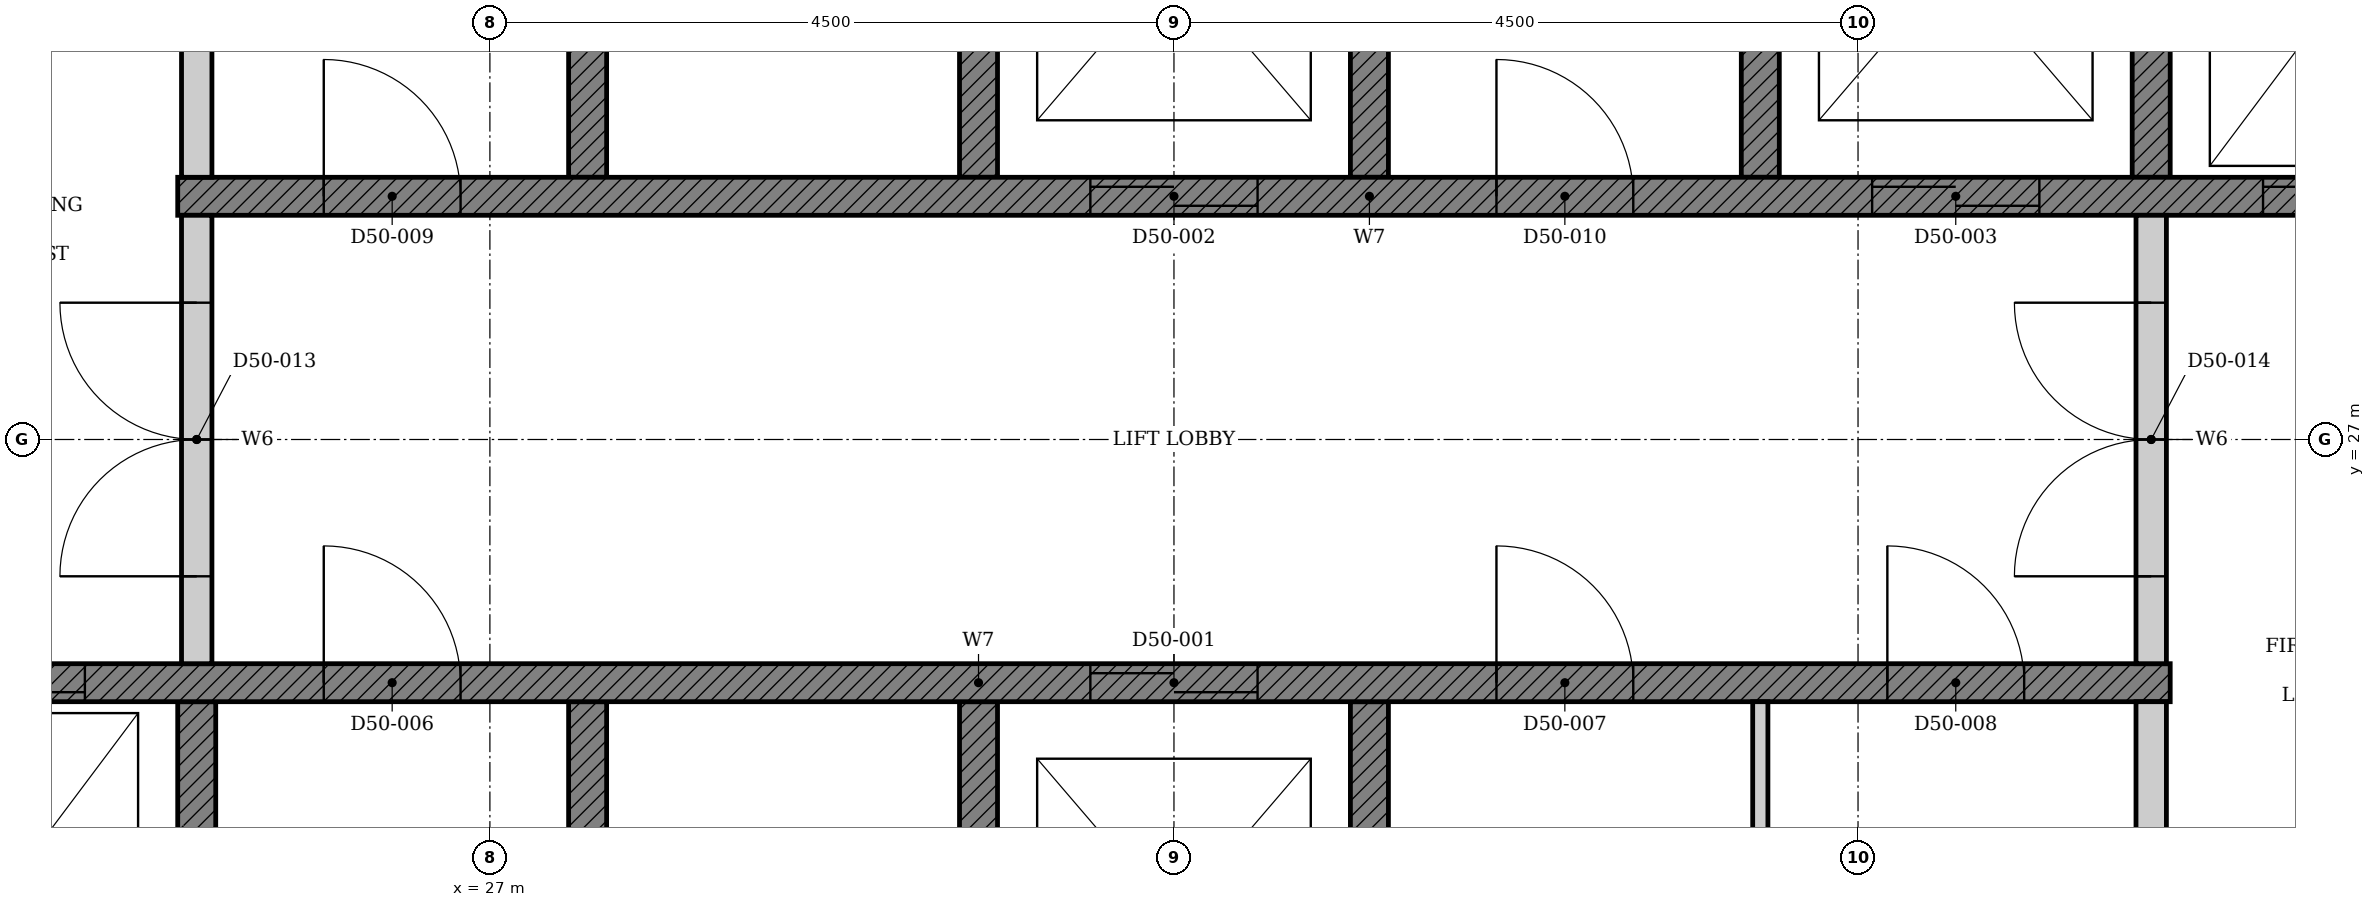
"""IFC4 building model, lengths in metres.
Left out: names, types, materials, properties, quantities, classifications, styles, units other than length and angle.
Written with IfcOpenShell. Run it as: python <this file> out.ifc"""

import sys

from ifc_helpers import new_model, si_unit, direction, frame, frame_2d, origin, place, context, subcontext, project, spatial, polyline, rectangle, outline, extrude, element, fill, save


model = new_model("IFC4")
c1 = context("Model", 3, precision=1e-05, world=origin(), true_north=direction((0.0, 1.0)))
c2 = subcontext(c1, "Body", "Model", "MODEL_VIEW")
j1 = project(units=[si_unit("LENGTHUNIT", "METRE"), si_unit("PLANEANGLEUNIT", "RADIAN")], contexts=[c1])
p1 = place(None, origin())
s1 = spatial("IfcSite", under=j1, at=p1, CompositionType="ELEMENT")
p2 = place(p1, origin())
s2 = spatial("IfcBuilding", under=s1, at=p2, CompositionType="ELEMENT")
p3 = place(p2, frame((0.0, 0.0, 199.8)))
s3 = spatial("IfcBuildingStorey", under=s2, at=p3, CompositionType="ELEMENT", Elevation=199.8)
p4 = place(p3, origin())
e1 = element("IfcWall", 1, at=p4, inside=s3, PredefinedType="SHEAR", context=c2, shape_type="SweptSolid", body=[
    extrude(outline(polyline([(22.375, 22.35), (25.197, 22.35), (25.197, 25.275), (24.947, 25.275), (24.947, 22.65), (22.625, 22.65), (22.625, 25.275), (22.375, 25.275), (22.375, 22.35)])), origin(), (0.0, 0.0, 1.0), 3.4),
])
p5 = place(p3, origin())
e2 = element("IfcWall", 2, at=p5, inside=s3, PredefinedType="SHEAR", context=c2, shape_type="SweptSolid", body=[
    extrude(outline(polyline([(27.518, 22.35), (32.911, 22.35), (32.911, 25.275), (32.661, 25.275), (32.661, 22.65), (30.339, 22.65), (30.339, 25.275), (30.089, 25.275), (30.089, 22.65), (27.768, 22.65), (27.768, 25.275), (27.518, 25.275), (27.518, 22.35)])), origin(), (0.0, 0.0, 1.0), 3.4),
])
p6 = place(p3, origin())
e3 = element("IfcWall", 3, at=p6, inside=s3, PredefinedType="SHEAR", context=c2, shape_type="SweptSolid", body=[
    extrude(outline(polyline([(27.518, 28.725), (27.768, 28.725), (27.768, 31.35), (30.089, 31.35), (30.089, 28.725), (30.339, 28.725), (30.339, 31.35), (32.661, 31.35), (32.661, 28.725), (32.911, 28.725), (32.911, 31.65), (27.518, 31.65), (27.518, 28.725)])), origin(), (0.0, 0.0, 1.0), 3.4),
])
p7 = place(p3, origin())
e4 = element("IfcWall", 4, at=p7, inside=s3, PredefinedType="SHEAR", context=c2, shape_type="SweptSolid", body=[
    extrude(outline(polyline([(35.232, 28.725), (35.482, 28.725), (35.482, 31.35), (37.803, 31.35), (37.803, 28.725), (38.053, 28.725), (38.053, 31.35), (40.375, 31.35), (40.375, 28.725), (40.625, 28.725), (40.625, 31.65), (35.232, 31.65), (35.232, 28.725)])), origin(), (0.0, 0.0, 1.0), 3.4),
])
p8 = place(p3, frame((22.375, 25.4, 0.0), z_axis=(0.0, 0.0, 1.0), x_axis=(1.0, 0.0, 0.0)))
e5 = element("IfcWall", 5, at=p8, inside=s3, PredefinedType="SHEAR", context=c2, shape_type="SweptSolid", body=[
    extrude(rectangle(XDim=15.678, YDim=0.25, at=frame_2d((7.839, 0.0))), origin(), (0.0, 0.0, 1.0), 3.4),
])
p9 = place(p8, frame((8.575, 0.0, 0.0)))
e6 = element("IfcOpeningElement", 6, at=p9, cuts=e5, PredefinedType="OPENING", context=c2, shape_type="SweptSolid", body=[
    extrude(rectangle(XDim=1.1, YDim=2.1, at=frame_2d((0.55, 1.05))), frame((0.0, 0.135, 0.0), z_axis=(0.0, -1.0, 0.0), x_axis=(1.0, 0.0, 0.0)), (0.0, 0.0, 1.0), 0.27),
])
p10 = place(p8, frame((0.861, 0.0, 0.0)))
e7 = element("IfcOpeningElement", 7, at=p10, cuts=e5, PredefinedType="OPENING", context=c2, shape_type="SweptSolid", body=[
    extrude(rectangle(XDim=1.1, YDim=2.1, at=frame_2d((0.55, 1.05))), frame((0.0, 0.135, 0.0), z_axis=(0.0, -1.0, 0.0), x_axis=(1.0, 0.0, 0.0)), (0.0, 0.0, 1.0), 0.27),
])
p11 = place(p8, frame((3.532, 0.0, 0.0)))
e8 = element("IfcOpeningElement", 8, at=p11, cuts=e5, PredefinedType="OPENING", context=c2, shape_type="SweptSolid", body=[
    extrude(rectangle(XDim=0.9, YDim=2.1, at=frame_2d((0.45, 1.05))), frame((0.0, 0.135, 0.0), z_axis=(0.0, -1.0, 0.0), x_axis=(1.0, 0.0, 0.0)), (0.0, 0.0, 1.0), 0.27),
])
p12 = place(p8, frame((11.246, 0.0, 0.0)))
e9 = element("IfcOpeningElement", 9, at=p12, cuts=e5, PredefinedType="OPENING", context=c2, shape_type="SweptSolid", body=[
    extrude(rectangle(XDim=0.9, YDim=2.1, at=frame_2d((0.45, 1.05))), frame((0.0, 0.135, 0.0), z_axis=(0.0, -1.0, 0.0), x_axis=(1.0, 0.0, 0.0)), (0.0, 0.0, 1.0), 0.27),
])
p13 = place(p8, frame((13.818, 0.0, 0.0)))
e10 = element("IfcOpeningElement", 10, at=p13, cuts=e5, PredefinedType="OPENING", context=c2, shape_type="SweptSolid", body=[
    extrude(rectangle(XDim=0.9, YDim=2.1, at=frame_2d((0.45, 1.05))), frame((0.0, 0.135, 0.0), z_axis=(0.0, -1.0, 0.0), x_axis=(1.0, 0.0, 0.0)), (0.0, 0.0, 1.0), 0.27),
])
p14 = place(p3, frame((24.947, 28.6, 0.0), z_axis=(0.0, 0.0, 1.0), x_axis=(1.0, 0.0, 0.0)))
e11 = element("IfcWall", 11, at=p14, inside=s3, PredefinedType="SHEAR", context=c2, shape_type="SweptSolid", body=[
    extrude(rectangle(XDim=15.678, YDim=0.25, at=frame_2d((7.839, 0.0))), origin(), (0.0, 0.0, 1.0), 3.4),
])
p15 = place(p14, frame((6.004, 0.0, 0.0)))
e12 = element("IfcOpeningElement", 12, at=p15, cuts=e11, PredefinedType="OPENING", context=c2, shape_type="SweptSolid", body=[
    extrude(rectangle(XDim=1.1, YDim=2.1, at=frame_2d((0.55, 1.05))), frame((0.0, 0.135, 0.0), z_axis=(0.0, -1.0, 0.0), x_axis=(1.0, 0.0, 0.0)), (0.0, 0.0, 1.0), 0.27),
])
p16 = place(p14, frame((11.146, 0.0, 0.0)))
e13 = element("IfcOpeningElement", 13, at=p16, cuts=e11, PredefinedType="OPENING", context=c2, shape_type="SweptSolid", body=[
    extrude(rectangle(XDim=1.1, YDim=2.1, at=frame_2d((0.55, 1.05))), frame((0.0, 0.135, 0.0), z_axis=(0.0, -1.0, 0.0), x_axis=(1.0, 0.0, 0.0)), (0.0, 0.0, 1.0), 0.27),
])
p17 = place(p14, frame((13.718, 0.0, 0.0)))
e14 = element("IfcOpeningElement", 14, at=p17, cuts=e11, PredefinedType="OPENING", context=c2, shape_type="SweptSolid", body=[
    extrude(rectangle(XDim=1.1, YDim=2.1, at=frame_2d((0.55, 1.05))), frame((0.0, 0.135, 0.0), z_axis=(0.0, -1.0, 0.0), x_axis=(1.0, 0.0, 0.0)), (0.0, 0.0, 1.0), 0.27),
])
p18 = place(p14, frame((0.961, 0.0, 0.0)))
e15 = element("IfcOpeningElement", 15, at=p18, cuts=e11, PredefinedType="OPENING", context=c2, shape_type="SweptSolid", body=[
    extrude(rectangle(XDim=0.9, YDim=2.1, at=frame_2d((0.45, 1.05))), frame((0.0, 0.135, 0.0), z_axis=(0.0, -1.0, 0.0), x_axis=(1.0, 0.0, 0.0)), (0.0, 0.0, 1.0), 0.27),
])
p19 = place(p14, frame((8.675, 0.0, 0.0)))
e16 = element("IfcOpeningElement", 16, at=p19, cuts=e11, PredefinedType="OPENING", context=c2, shape_type="SweptSolid", body=[
    extrude(rectangle(XDim=0.9, YDim=2.1, at=frame_2d((0.45, 1.05))), frame((0.0, 0.135, 0.0), z_axis=(0.0, -1.0, 0.0), x_axis=(1.0, 0.0, 0.0)), (0.0, 0.0, 1.0), 0.27),
])
p20 = place(p3, frame((37.928, 22.65, 0.0), z_axis=(0.0, 0.0, 1.0), x_axis=(0.0, 1.0, 0.0)))
e17 = element("IfcWall", 17, at=p20, inside=s3, PredefinedType="PARTITIONING", context=c2, shape_type="SweptSolid", body=[
    extrude(rectangle(XDim=2.625, YDim=0.2, at=frame_2d((1.312, 0.0))), origin(), (0.0, 0.0, 1.0), 3.4),
])
p21 = place(p3, frame((35.357, 22.65, 0.0), z_axis=(0.0, 0.0, 1.0), x_axis=(0.0, 1.0, 0.0)))
e18 = element("IfcWall", 18, at=p21, inside=s3, PredefinedType="PARTITIONING", context=c2, shape_type="SweptSolid", body=[
    extrude(rectangle(XDim=2.625, YDim=0.1, at=frame_2d((1.312, 0.0))), origin(), (0.0, 0.0, 1.0), 3.4),
])
p22 = place(p3, frame((25.072, 28.725, 0.0), z_axis=(0.0, 0.0, 1.0), x_axis=(0.0, 1.0, 0.0)))
e19 = element("IfcWall", 19, at=p22, inside=s3, PredefinedType="PARTITIONING", context=c2, shape_type="SweptSolid", body=[
    extrude(rectangle(XDim=2.625, YDim=0.2, at=frame_2d((1.312, 0.0))), origin(), (0.0, 0.0, 1.0), 3.4),
])
p23 = place(p3, frame((25.072, 25.525, 0.0), z_axis=(0.0, 0.0, 1.0), x_axis=(0.0, 1.0, 0.0)))
e20 = element("IfcWall", 20, at=p23, inside=s3, PredefinedType="PARTITIONING", context=c2, shape_type="SweptSolid", body=[
    extrude(rectangle(XDim=2.95, YDim=0.2, at=frame_2d((1.475, 0.0))), origin(), (0.0, 0.0, 1.0), 3.4),
])
p24 = place(p23, frame((0.575, 0.0, 0.0)))
e21 = element("IfcOpeningElement", 21, at=p24, cuts=e20, PredefinedType="OPENING", context=c2, shape_type="SweptSolid", body=[
    extrude(rectangle(XDim=1.8, YDim=2.1, at=frame_2d((0.9, 1.05))), frame((0.0, 0.11, 0.0), z_axis=(0.0, -1.0, 0.0), x_axis=(1.0, 0.0, 0.0)), (0.0, 0.0, 1.0), 0.22),
])
p25 = place(p3, frame((37.928, 25.525, 0.0), z_axis=(0.0, 0.0, 1.0), x_axis=(0.0, 1.0, 0.0)))
e22 = element("IfcWall", 22, at=p25, inside=s3, PredefinedType="PARTITIONING", context=c2, shape_type="SweptSolid", body=[
    extrude(rectangle(XDim=2.95, YDim=0.2, at=frame_2d((1.475, 0.0))), origin(), (0.0, 0.0, 1.0), 3.4),
])
p26 = place(p25, frame((0.575, 0.0, 0.0)))
e23 = element("IfcOpeningElement", 23, at=p26, cuts=e22, PredefinedType="OPENING", context=c2, shape_type="SweptSolid", body=[
    extrude(rectangle(XDim=1.8, YDim=2.1, at=frame_2d((0.9, 1.05))), frame((0.0, 0.11, 0.0), z_axis=(0.0, -1.0, 0.0), x_axis=(1.0, 0.0, 0.0)), (0.0, 0.0, 1.0), 0.22),
])
p27 = place(p9, origin())
e24 = element("IfcDoor", 24, at=p27, inside=s3, OperationType="DOUBLE_DOOR_SLIDING", PredefinedType="DOOR", context=c2, shape_type="SweptSolid", body=[
    extrude(rectangle(XDim=1.1, YDim=2.1, at=frame_2d((0.55, 1.05))), frame((0.0, 0.025, 0.0), z_axis=(0.0, -1.0, 0.0), x_axis=(1.0, 0.0, 0.0)), (0.0, 0.0, 1.0), 0.05),
])
fill(e6, e24)
p28 = place(p15, origin())
e25 = element("IfcDoor", 25, at=p28, inside=s3, OperationType="DOUBLE_DOOR_SLIDING", PredefinedType="DOOR", context=c2, shape_type="SweptSolid", body=[
    extrude(rectangle(XDim=1.1, YDim=2.1, at=frame_2d((0.55, 1.05))), frame((0.0, 0.025, 0.0), z_axis=(0.0, -1.0, 0.0), x_axis=(1.0, 0.0, 0.0)), (0.0, 0.0, 1.0), 0.05),
])
fill(e12, e25)
p29 = place(p16, origin())
e26 = element("IfcDoor", 26, at=p29, inside=s3, OperationType="DOUBLE_DOOR_SLIDING", PredefinedType="DOOR", context=c2, shape_type="SweptSolid", body=[
    extrude(rectangle(XDim=1.1, YDim=2.1, at=frame_2d((0.55, 1.05))), frame((0.0, 0.025, 0.0), z_axis=(0.0, -1.0, 0.0), x_axis=(1.0, 0.0, 0.0)), (0.0, 0.0, 1.0), 0.05),
])
fill(e13, e26)
p30 = place(p10, origin())
e27 = element("IfcDoor", 27, at=p30, inside=s3, OperationType="DOUBLE_DOOR_SLIDING", PredefinedType="DOOR", context=c2, shape_type="SweptSolid", body=[
    extrude(rectangle(XDim=1.1, YDim=2.1, at=frame_2d((0.55, 1.05))), frame((0.0, 0.025, 0.0), z_axis=(0.0, -1.0, 0.0), x_axis=(1.0, 0.0, 0.0)), (0.0, 0.0, 1.0), 0.05),
])
fill(e7, e27)
p31 = place(p17, origin())
e28 = element("IfcDoor", 28, at=p31, inside=s3, OperationType="DOUBLE_DOOR_SLIDING", PredefinedType="DOOR", context=c2, shape_type="SweptSolid", body=[
    extrude(rectangle(XDim=1.1, YDim=2.1, at=frame_2d((0.55, 1.05))), frame((0.0, 0.025, 0.0), z_axis=(0.0, -1.0, 0.0), x_axis=(1.0, 0.0, 0.0)), (0.0, 0.0, 1.0), 0.05),
])
fill(e14, e28)
p32 = place(p11, origin())
e29 = element("IfcDoor", 29, at=p32, inside=s3, OperationType="SINGLE_SWING_LEFT", PredefinedType="DOOR", context=c2, shape_type="SweptSolid", body=[
    extrude(rectangle(XDim=0.9, YDim=2.1, at=frame_2d((0.45, 1.05))), frame((0.0, 0.025, 0.0), z_axis=(0.0, -1.0, 0.0), x_axis=(1.0, 0.0, 0.0)), (0.0, 0.0, 1.0), 0.05),
])
fill(e8, e29)
p33 = place(p12, origin())
e30 = element("IfcDoor", 30, at=p33, inside=s3, OperationType="SINGLE_SWING_LEFT", PredefinedType="DOOR", context=c2, shape_type="SweptSolid", body=[
    extrude(rectangle(XDim=0.9, YDim=2.1, at=frame_2d((0.45, 1.05))), frame((0.0, 0.025, 0.0), z_axis=(0.0, -1.0, 0.0), x_axis=(1.0, 0.0, 0.0)), (0.0, 0.0, 1.0), 0.05),
])
fill(e9, e30)
p34 = place(p13, origin())
e31 = element("IfcDoor", 31, at=p34, inside=s3, OperationType="SINGLE_SWING_LEFT", PredefinedType="DOOR", context=c2, shape_type="SweptSolid", body=[
    extrude(rectangle(XDim=0.9, YDim=2.1, at=frame_2d((0.45, 1.05))), frame((0.0, 0.025, 0.0), z_axis=(0.0, -1.0, 0.0), x_axis=(1.0, 0.0, 0.0)), (0.0, 0.0, 1.0), 0.05),
])
fill(e10, e31)
p35 = place(p18, origin())
e32 = element("IfcDoor", 32, at=p35, inside=s3, OperationType="SINGLE_SWING_LEFT", PredefinedType="DOOR", context=c2, shape_type="SweptSolid", body=[
    extrude(rectangle(XDim=0.9, YDim=2.1, at=frame_2d((0.45, 1.05))), frame((0.0, 0.025, 0.0), z_axis=(0.0, -1.0, 0.0), x_axis=(1.0, 0.0, 0.0)), (0.0, 0.0, 1.0), 0.05),
])
fill(e15, e32)
p36 = place(p19, origin())
e33 = element("IfcDoor", 33, at=p36, inside=s3, OperationType="SINGLE_SWING_LEFT", PredefinedType="DOOR", context=c2, shape_type="SweptSolid", body=[
    extrude(rectangle(XDim=0.9, YDim=2.1, at=frame_2d((0.45, 1.05))), frame((0.0, 0.025, 0.0), z_axis=(0.0, -1.0, 0.0), x_axis=(1.0, 0.0, 0.0)), (0.0, 0.0, 1.0), 0.05),
])
fill(e16, e33)
p37 = place(p24, origin())
e34 = element("IfcDoor", 34, at=p37, inside=s3, OperationType="DOUBLE_DOOR_SINGLE_SWING", PredefinedType="DOOR", context=c2, shape_type="SweptSolid", body=[
    extrude(rectangle(XDim=1.8, YDim=2.1, at=frame_2d((0.9, 1.05))), frame((0.0, 0.025, 0.0), z_axis=(0.0, -1.0, 0.0), x_axis=(1.0, 0.0, 0.0)), (0.0, 0.0, 1.0), 0.05),
])
fill(e21, e34)
p38 = place(p26, origin())
e35 = element("IfcDoor", 35, at=p38, inside=s3, OperationType="DOUBLE_DOOR_SINGLE_SWING", PredefinedType="DOOR", context=c2, shape_type="SweptSolid", body=[
    extrude(rectangle(XDim=1.8, YDim=2.1, at=frame_2d((0.9, 1.05))), frame((0.0, 0.025, 0.0), z_axis=(0.0, -1.0, 0.0), x_axis=(1.0, 0.0, 0.0)), (0.0, 0.0, 1.0), 0.05),
])
fill(e23, e35)
save(model, sys.argv[1])
